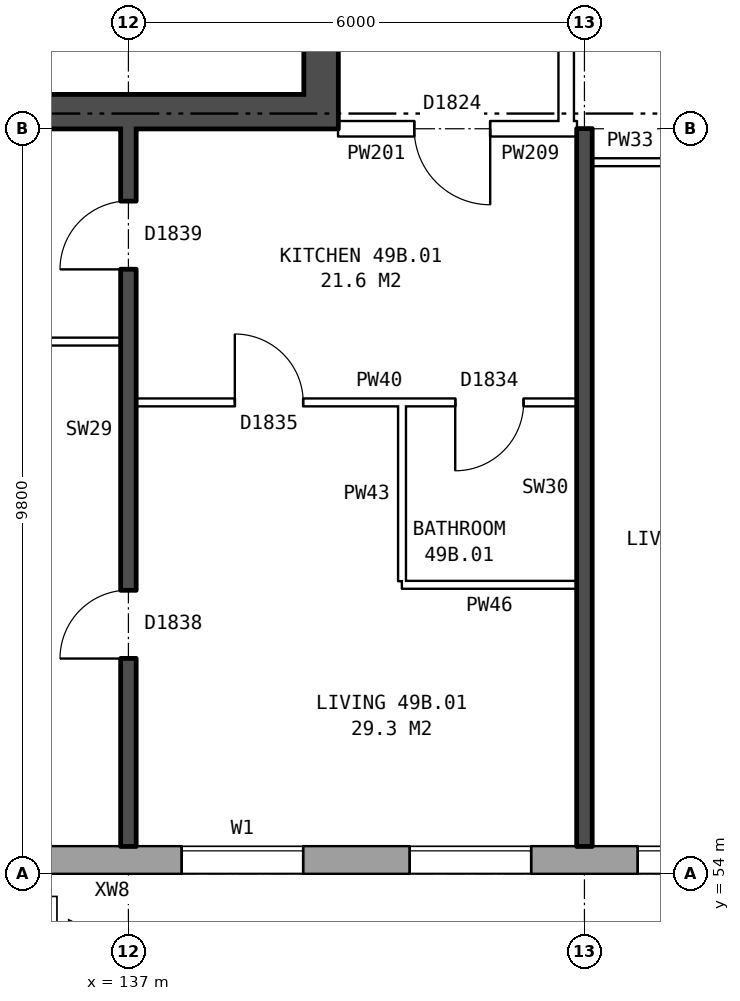
"""IFC4 building model, lengths in metres.
Left out: names, types, materials, properties, quantities, classifications, styles, units other than length and angle.
Written with IfcOpenShell. Run it as: python <this file> out.ifc"""

import sys

from ifc_helpers import new_model, si_unit, direction, frame, frame_2d, origin, place, context, subcontext, project, spatial, rectangle, extrude, element, fill, save


model = new_model("IFC4")
c1 = context("Model", 3, precision=1e-05, world=origin(), true_north=direction((0.0, 1.0)))
c2 = subcontext(c1, "Body", "Model", "MODEL_VIEW")
j1 = project(units=[si_unit("LENGTHUNIT", "METRE"), si_unit("PLANEANGLEUNIT", "RADIAN")], contexts=[c1])
p1 = place(None, origin())
s1 = spatial("IfcSite", under=j1, at=p1, CompositionType="ELEMENT")
p2 = place(p1, origin())
s2 = spatial("IfcBuilding", under=s1, at=p2, CompositionType="ELEMENT")
p3 = place(p2, frame((0.0, 0.0, 175.8)))
s3 = spatial("IfcBuildingStorey", under=s2, at=p3, CompositionType="ELEMENT", Elevation=175.8)
p4 = place(p3, frame((134.075, 54.18, 0.0), z_axis=(0.0, 0.0, 1.0), x_axis=(1.0, 0.0, 0.0)))
e1 = element("IfcWall", 1, at=p4, inside=s3, PredefinedType="STANDARD", context=c2, shape_type="SweptSolid", body=[
    extrude(rectangle(XDim=33.101, YDim=0.36, at=frame_2d((16.55, 0.0))), origin(), (0.0, 0.0, 1.0), 2.85),
])
p5 = place(p4, frame((0.3, 0.0, 0.8)))
e2 = element("IfcOpeningElement", 2, at=p5, cuts=e1, PredefinedType="OPENING", context=c2, shape_type="SweptSolid", body=[
    extrude(rectangle(XDim=0.6, YDim=1.8, at=frame_2d((0.3, 0.9))), frame((0.0, 0.19, 0.0), z_axis=(0.0, -1.0, 0.0), x_axis=(1.0, 0.0, 0.0)), (0.0, 0.0, 1.0), 0.38),
])
p6 = place(p4, frame((3.625, 0.0, 0.8)))
e3 = element("IfcOpeningElement", 3, at=p6, cuts=e1, PredefinedType="OPENING", context=c2, shape_type="SweptSolid", body=[
    extrude(rectangle(XDim=1.6, YDim=1.8, at=frame_2d((0.8, 0.9))), frame((0.0, 0.19, 0.0), z_axis=(0.0, -1.0, 0.0), x_axis=(1.0, 0.0, 0.0)), (0.0, 0.0, 1.0), 0.38),
])
p7 = place(p4, frame((6.625, 0.0, 0.8)))
e4 = element("IfcOpeningElement", 4, at=p7, cuts=e1, PredefinedType="OPENING", context=c2, shape_type="SweptSolid", body=[
    extrude(rectangle(XDim=1.6, YDim=1.8, at=frame_2d((0.8, 0.9))), frame((0.0, 0.19, 0.0), z_axis=(0.0, -1.0, 0.0), x_axis=(1.0, 0.0, 0.0)), (0.0, 0.0, 1.0), 0.38),
])
p8 = place(p4, frame((9.625, 0.0, 0.8)))
e5 = element("IfcOpeningElement", 5, at=p8, cuts=e1, PredefinedType="OPENING", context=c2, shape_type="SweptSolid", body=[
    extrude(rectangle(XDim=1.6, YDim=1.8, at=frame_2d((0.8, 0.9))), frame((0.0, 0.19, 0.0), z_axis=(0.0, -1.0, 0.0), x_axis=(1.0, 0.0, 0.0)), (0.0, 0.0, 1.0), 0.38),
])
p9 = place(p4, frame((12.625, 0.0, 0.8)))
e6 = element("IfcOpeningElement", 6, at=p9, cuts=e1, PredefinedType="OPENING", context=c2, shape_type="SweptSolid", body=[
    extrude(rectangle(XDim=1.6, YDim=1.8, at=frame_2d((0.8, 0.9))), frame((0.0, 0.19, 0.0), z_axis=(0.0, -1.0, 0.0), x_axis=(1.0, 0.0, 0.0)), (0.0, 0.0, 1.0), 0.38),
])
p10 = place(p4, frame((15.625, 0.0, 0.8)))
e7 = element("IfcOpeningElement", 7, at=p10, cuts=e1, PredefinedType="OPENING", context=c2, shape_type="SweptSolid", body=[
    extrude(rectangle(XDim=1.6, YDim=1.8, at=frame_2d((0.8, 0.9))), frame((0.0, 0.19, 0.0), z_axis=(0.0, -1.0, 0.0), x_axis=(1.0, 0.0, 0.0)), (0.0, 0.0, 1.0), 0.38),
])
p11 = place(p4, frame((18.625, 0.0, 0.8)))
e8 = element("IfcOpeningElement", 8, at=p11, cuts=e1, PredefinedType="OPENING", context=c2, shape_type="SweptSolid", body=[
    extrude(rectangle(XDim=1.6, YDim=1.8, at=frame_2d((0.8, 0.9))), frame((0.0, 0.19, 0.0), z_axis=(0.0, -1.0, 0.0), x_axis=(1.0, 0.0, 0.0)), (0.0, 0.0, 1.0), 0.38),
])
p12 = place(p4, frame((21.625, 0.0, 0.8)))
e9 = element("IfcOpeningElement", 9, at=p12, cuts=e1, PredefinedType="OPENING", context=c2, shape_type="SweptSolid", body=[
    extrude(rectangle(XDim=1.6, YDim=1.8, at=frame_2d((0.8, 0.9))), frame((0.0, 0.19, 0.0), z_axis=(0.0, -1.0, 0.0), x_axis=(1.0, 0.0, 0.0)), (0.0, 0.0, 1.0), 0.38),
])
p13 = place(p4, frame((24.625, 0.0, 0.8)))
e10 = element("IfcOpeningElement", 10, at=p13, cuts=e1, PredefinedType="OPENING", context=c2, shape_type="SweptSolid", body=[
    extrude(rectangle(XDim=1.6, YDim=1.8, at=frame_2d((0.8, 0.9))), frame((0.0, 0.19, 0.0), z_axis=(0.0, -1.0, 0.0), x_axis=(1.0, 0.0, 0.0)), (0.0, 0.0, 1.0), 0.38),
])
p14 = place(p4, frame((27.625, 0.0, 0.8)))
e11 = element("IfcOpeningElement", 11, at=p14, cuts=e1, PredefinedType="OPENING", context=c2, shape_type="SweptSolid", body=[
    extrude(rectangle(XDim=1.6, YDim=1.8, at=frame_2d((0.8, 0.9))), frame((0.0, 0.19, 0.0), z_axis=(0.0, -1.0, 0.0), x_axis=(1.0, 0.0, 0.0)), (0.0, 0.0, 1.0), 0.38),
])
p15 = place(p4, frame((29.525, 0.0, 0.8)))
e12 = element("IfcOpeningElement", 12, at=p15, cuts=e1, PredefinedType="OPENING", context=c2, shape_type="SweptSolid", body=[
    extrude(rectangle(XDim=0.6, YDim=0.9, at=frame_2d((0.3, 0.45))), frame((0.0, 0.19, 0.0), z_axis=(0.0, -1.0, 0.0), x_axis=(1.0, 0.0, 0.0)), (0.0, 0.0, 1.0), 0.38),
])
p16 = place(p4, frame((1.2, 0.0, 1.7)))
e13 = element("IfcOpeningElement", 13, at=p16, cuts=e1, PredefinedType="OPENING", context=c2, shape_type="SweptSolid", body=[
    extrude(rectangle(XDim=0.6, YDim=0.9, at=frame_2d((0.3, 0.45))), frame((0.0, 0.19, 0.0), z_axis=(0.0, -1.0, 0.0), x_axis=(1.0, 0.0, 0.0)), (0.0, 0.0, 1.0), 0.38),
])
p17 = place(p4, frame((31.575, 0.0, 1.4)))
e14 = element("IfcOpeningElement", 14, at=p17, cuts=e1, PredefinedType="OPENING", context=c2, shape_type="SweptSolid", body=[
    extrude(rectangle(XDim=1.2, YDim=1.2, at=frame_2d((0.6, 0.6))), frame((0.0, 0.19, 0.0), z_axis=(0.0, -1.0, 0.0), x_axis=(1.0, 0.0, 0.0)), (0.0, 0.0, 1.0), 0.38),
])
p18 = place(p3, frame((139.535, 63.8, 0.0), z_axis=(0.0, 0.0, 1.0), x_axis=(0.0, 1.0, 0.0)))
e15 = element("IfcWall", 15, at=p18, inside=s3, PredefinedType="SHEAR", context=c2, shape_type="SweptSolid", body=[
    extrude(rectangle(XDim=12.4, YDim=0.45, at=frame_2d((6.2, 0.0))), origin(), (0.0, 0.0, 1.0), 2.85),
])
p19 = place(p18, frame((1.325, 0.0, 0.0)))
e16 = element("IfcOpeningElement", 16, at=p19, cuts=e15, PredefinedType="OPENING", context=c2, shape_type="SweptSolid", body=[
    extrude(rectangle(XDim=1.1, YDim=2.1, at=frame_2d((0.55, 1.05))), frame((0.0, 0.235, 0.0), z_axis=(0.0, -1.0, 0.0), x_axis=(1.0, 0.0, 0.0)), (0.0, 0.0, 1.0), 0.47),
])
p20 = place(p18, frame((3.6, 0.0, 0.0)))
e17 = element("IfcOpeningElement", 17, at=p20, cuts=e15, PredefinedType="OPENING", context=c2, shape_type="SweptSolid", body=[
    extrude(rectangle(XDim=1.1, YDim=2.1, at=frame_2d((0.55, 1.05))), frame((0.0, 0.235, 0.0), z_axis=(0.0, -1.0, 0.0), x_axis=(1.0, 0.0, 0.0)), (0.0, 0.0, 1.0), 0.47),
])
p21 = place(p18, frame((5.8, 0.0, 0.0)))
e18 = element("IfcOpeningElement", 18, at=p21, cuts=e15, PredefinedType="OPENING", context=c2, shape_type="SweptSolid", body=[
    extrude(rectangle(XDim=1.1, YDim=2.1, at=frame_2d((0.55, 1.05))), frame((0.0, 0.235, 0.0), z_axis=(0.0, -1.0, 0.0), x_axis=(1.0, 0.0, 0.0)), (0.0, 0.0, 1.0), 0.47),
])
p22 = place(p18, frame((9.9, 0.0, 0.0)))
e19 = element("IfcOpeningElement", 19, at=p22, cuts=e15, PredefinedType="OPENING", context=c2, shape_type="SweptSolid", body=[
    extrude(rectangle(XDim=1.1, YDim=2.1, at=frame_2d((0.55, 1.05))), frame((0.0, 0.235, 0.0), z_axis=(0.0, -1.0, 0.0), x_axis=(1.0, 0.0, 0.0)), (0.0, 0.0, 1.0), 0.47),
])
p23 = place(p18, frame((8.125, 0.0, 0.0)))
e20 = element("IfcOpeningElement", 20, at=p23, cuts=e15, PredefinedType="OPENING", context=c2, shape_type="SweptSolid", body=[
    extrude(rectangle(XDim=0.85, YDim=2.1, at=frame_2d((0.425, 1.05))), frame((0.0, 0.235, 0.0), z_axis=(0.0, -1.0, 0.0), x_axis=(1.0, 0.0, 0.0)), (0.0, 0.0, 1.0), 0.47),
])
p24 = place(p3, frame((139.31, 64.025, 0.0), z_axis=(0.0, 0.0, 1.0), x_axis=(-1.0, 0.0, 0.0)))
e21 = element("IfcWall", 21, at=p24, inside=s3, PredefinedType="SHEAR", context=c2, shape_type="SweptSolid", body=[
    extrude(rectangle(XDim=7.5, YDim=0.45, at=frame_2d((3.75, 0.0))), origin(), (0.0, 0.0, 1.0), 2.85),
])
p25 = place(p3, frame((142.76, 63.9, 0.0), z_axis=(0.0, 0.0, 1.0), x_axis=(0.0, 1.0, 0.0)))
e22 = element("IfcWall", 22, at=p25, inside=s3, PredefinedType="PARTITIONING", context=c2, shape_type="SweptSolid", body=[
    extrude(rectangle(XDim=12.2, YDim=0.2, at=frame_2d((6.1, 0.0))), origin(), (0.0, 0.0, 1.0), 2.85),
])
p26 = place(p25, frame((5.1, 0.0, 0.0)))
e23 = element("IfcOpeningElement", 23, at=p26, cuts=e22, PredefinedType="OPENING", context=c2, shape_type="SweptSolid", body=[
    extrude(rectangle(XDim=2.0, YDim=2.1, at=frame_2d((1.0, 1.05))), frame((0.0, 0.11, 0.0), z_axis=(0.0, -1.0, 0.0), x_axis=(1.0, 0.0, 0.0)), (0.0, 0.0, 1.0), 0.22),
])
p27 = place(p3, frame((140.6, 57.8, 0.0), z_axis=(0.0, 0.0, 1.0), x_axis=(1.0, 0.0, 0.0)))
e24 = element("IfcWall", 24, at=p27, inside=s3, PredefinedType="PARTITIONING", context=c2, shape_type="SweptSolid", body=[
    extrude(rectangle(XDim=2.3, YDim=0.1, at=frame_2d((1.15, 0.0))), origin(), (0.0, 0.0, 1.0), 2.85),
])
p28 = place(p3, frame((137.1, 60.2, 0.0), z_axis=(0.0, 0.0, 1.0), x_axis=(1.0, 0.0, 0.0)))
e25 = element("IfcWall", 25, at=p28, inside=s3, PredefinedType="PARTITIONING", context=c2, shape_type="SweptSolid", body=[
    extrude(rectangle(XDim=5.8, YDim=0.1, at=frame_2d((2.9, 0.0))), origin(), (0.0, 0.0, 1.0), 2.85),
])
p29 = place(p28, frame((1.3, 0.0, 0.0)))
e26 = element("IfcOpeningElement", 26, at=p29, cuts=e25, PredefinedType="OPENING", context=c2, shape_type="SweptSolid", body=[
    extrude(rectangle(XDim=0.9, YDim=2.1, at=frame_2d((0.45, 1.05))), frame((0.0, 0.06, 0.0), z_axis=(0.0, -1.0, 0.0), x_axis=(1.0, 0.0, 0.0)), (0.0, 0.0, 1.0), 0.12),
])
p30 = place(p28, frame((4.2, 0.0, 0.0)))
e27 = element("IfcOpeningElement", 27, at=p30, cuts=e25, PredefinedType="OPENING", context=c2, shape_type="SweptSolid", body=[
    extrude(rectangle(XDim=0.9, YDim=2.1, at=frame_2d((0.45, 1.05))), frame((0.0, 0.06, 0.0), z_axis=(0.0, -1.0, 0.0), x_axis=(1.0, 0.0, 0.0)), (0.0, 0.0, 1.0), 0.12),
])
p31 = place(p3, frame((131.36, 61.0, 0.0), z_axis=(0.0, 0.0, 1.0), x_axis=(1.0, 0.0, 0.0)))
e28 = element("IfcWall", 28, at=p31, inside=s3, PredefinedType="PARTITIONING", context=c2, shape_type="SweptSolid", body=[
    extrude(rectangle(XDim=5.54, YDim=0.1, at=frame_2d((2.77, 0.0))), origin(), (0.0, 0.0, 1.0), 2.85),
])
p32 = place(p3, frame((143.1, 63.36, 0.0), z_axis=(0.0, 0.0, 1.0), x_axis=(1.0, 0.0, 0.0)))
e29 = element("IfcWall", 29, at=p32, inside=s3, PredefinedType="PARTITIONING", context=c2, shape_type="SweptSolid", body=[
    extrude(rectangle(XDim=2.9, YDim=0.1, at=frame_2d((1.45, 0.0))), origin(), (0.0, 0.0, 1.0), 2.85),
])
p33 = place(p32, frame((1.0, 0.0, 0.0)))
e30 = element("IfcOpeningElement", 30, at=p33, cuts=e29, PredefinedType="OPENING", context=c2, shape_type="SweptSolid", body=[
    extrude(rectangle(XDim=0.9, YDim=2.1, at=frame_2d((0.45, 1.05))), frame((0.0, 0.06, 0.0), z_axis=(0.0, -1.0, 0.0), x_axis=(1.0, 0.0, 0.0)), (0.0, 0.0, 1.0), 0.12),
])
p34 = place(p3, frame((139.76, 63.8, 0.0), z_axis=(0.0, 0.0, 1.0), x_axis=(1.0, 0.0, 0.0)))
e31 = element("IfcWall", 31, at=p34, inside=s3, PredefinedType="PARTITIONING", context=c2, shape_type="SweptSolid", body=[
    extrude(rectangle(XDim=3.0, YDim=0.2, at=frame_2d((1.5, 0.0))), origin(), (0.0, 0.0, 1.0), 2.85),
])
p35 = place(p34, frame((1.0, 0.0, 0.0)))
e32 = element("IfcOpeningElement", 32, at=p35, cuts=e31, PredefinedType="OPENING", context=c2, shape_type="SweptSolid", body=[
    extrude(rectangle(XDim=1.0, YDim=2.1, at=frame_2d((0.5, 1.05))), frame((0.0, 0.11, 0.0), z_axis=(0.0, -1.0, 0.0), x_axis=(1.0, 0.0, 0.0)), (0.0, 0.0, 1.0), 0.22),
])
p36 = place(p3, frame((142.76, 63.8, 0.0), z_axis=(0.0, 0.0, 1.0), x_axis=(1.0, 0.0, 0.0)))
e33 = element("IfcWall", 33, at=p36, inside=s3, PredefinedType="PARTITIONING", context=c2, shape_type="SweptSolid", body=[
    extrude(rectangle(XDim=0.14, YDim=0.2, at=frame_2d((0.07, 0.0))), origin(), (0.0, 0.0, 1.0), 2.85),
])
p37 = place(p3, frame((137.0, 54.36, 0.0), z_axis=(0.0, 0.0, 1.0), x_axis=(0.0, 1.0, 0.0)))
e34 = element("IfcWall", 34, at=p37, inside=s3, PredefinedType="SOLIDWALL", context=c2, shape_type="SweptSolid", body=[
    extrude(rectangle(XDim=9.44, YDim=0.2, at=frame_2d((4.72, 0.0))), origin(), (0.0, 0.0, 1.0), 2.85),
])
p38 = place(p37, frame((2.47, 0.0, 0.0)))
e35 = element("IfcOpeningElement", 35, at=p38, cuts=e34, PredefinedType="OPENING", context=c2, shape_type="SweptSolid", body=[
    extrude(rectangle(XDim=0.9, YDim=2.1, at=frame_2d((0.45, 1.05))), frame((0.0, 0.11, 0.0), z_axis=(0.0, -1.0, 0.0), x_axis=(1.0, 0.0, 0.0)), (0.0, 0.0, 1.0), 0.22),
])
p39 = place(p37, frame((7.59, 0.0, 0.0)))
e36 = element("IfcOpeningElement", 36, at=p39, cuts=e34, PredefinedType="OPENING", context=c2, shape_type="SweptSolid", body=[
    extrude(rectangle(XDim=0.9, YDim=2.1, at=frame_2d((0.45, 1.05))), frame((0.0, 0.11, 0.0), z_axis=(0.0, -1.0, 0.0), x_axis=(1.0, 0.0, 0.0)), (0.0, 0.0, 1.0), 0.22),
])
p40 = place(p3, frame((140.6, 57.85, 0.0), z_axis=(0.0, 0.0, 1.0), x_axis=(0.0, 1.0, 0.0)))
e37 = element("IfcWall", 37, at=p40, inside=s3, PredefinedType="PARTITIONING", context=c2, shape_type="SweptSolid", body=[
    extrude(rectangle(XDim=2.3, YDim=0.1, at=frame_2d((1.15, 0.0))), origin(), (0.0, 0.0, 1.0), 2.85),
])
p41 = place(p3, frame((143.0, 54.36, 0.0), z_axis=(0.0, 0.0, 1.0), x_axis=(0.0, 1.0, 0.0)))
e38 = element("IfcWall", 38, at=p41, inside=s3, PredefinedType="SOLIDWALL", context=c2, shape_type="SweptSolid", body=[
    extrude(rectangle(XDim=9.44, YDim=0.2, at=frame_2d((4.72, 0.0))), origin(), (0.0, 0.0, 1.0), 2.85),
])
p42 = place(p6, origin())
e39 = element("IfcWindow", 39, at=p42, inside=s3, PartitioningType="SINGLE_PANEL", PredefinedType="WINDOW", context=c2, shape_type="SweptSolid", body=[
    extrude(rectangle(XDim=1.6, YDim=1.8, at=frame_2d((0.8, 0.9))), frame((0.0, 0.15, 0.0), z_axis=(0.0, -1.0, 0.0), x_axis=(1.0, 0.0, 0.0)), (0.0, 0.0, 1.0), 0.06),
])
fill(e3, e39)
p43 = place(p7, origin())
e40 = element("IfcWindow", 40, at=p43, inside=s3, PartitioningType="SINGLE_PANEL", PredefinedType="WINDOW", context=c2, shape_type="SweptSolid", body=[
    extrude(rectangle(XDim=1.6, YDim=1.8, at=frame_2d((0.8, 0.9))), frame((0.0, 0.15, 0.0), z_axis=(0.0, -1.0, 0.0), x_axis=(1.0, 0.0, 0.0)), (0.0, 0.0, 1.0), 0.06),
])
fill(e4, e40)
p44 = place(p8, origin())
e41 = element("IfcWindow", 41, at=p44, inside=s3, PartitioningType="SINGLE_PANEL", PredefinedType="WINDOW", context=c2, shape_type="SweptSolid", body=[
    extrude(rectangle(XDim=1.6, YDim=1.8, at=frame_2d((0.8, 0.9))), frame((0.0, 0.15, 0.0), z_axis=(0.0, -1.0, 0.0), x_axis=(1.0, 0.0, 0.0)), (0.0, 0.0, 1.0), 0.06),
])
fill(e5, e41)
p45 = place(p38, origin())
e42 = element("IfcDoor", 42, at=p45, inside=s3, OperationType="SINGLE_SWING_LEFT", PredefinedType="DOOR", context=c2, shape_type="SweptSolid", body=[
    extrude(rectangle(XDim=0.9, YDim=2.1, at=frame_2d((0.45, 1.05))), frame((0.0, 0.025, 0.0), z_axis=(0.0, -1.0, 0.0), x_axis=(1.0, 0.0, 0.0)), (0.0, 0.0, 1.0), 0.05),
])
fill(e35, e42)
p46 = place(p39, origin())
e43 = element("IfcDoor", 43, at=p46, inside=s3, OperationType="SINGLE_SWING_LEFT", PredefinedType="DOOR", context=c2, shape_type="SweptSolid", body=[
    extrude(rectangle(XDim=0.9, YDim=2.1, at=frame_2d((0.45, 1.05))), frame((0.0, 0.025, 0.0), z_axis=(0.0, -1.0, 0.0), x_axis=(1.0, 0.0, 0.0)), (0.0, 0.0, 1.0), 0.05),
])
fill(e36, e43)
p47 = place(p35, frame((1.0, 0.0, 0.0), z_axis=(0.0, 0.0, 1.0), x_axis=(-1.0, 0.0, 0.0)))
e44 = element("IfcDoor", 44, at=p47, inside=s3, OperationType="SINGLE_SWING_LEFT", PredefinedType="DOOR", context=c2, shape_type="SweptSolid", body=[
    extrude(rectangle(XDim=1.0, YDim=2.1, at=frame_2d((0.5, 1.05))), frame((0.0, 0.025, 0.0), z_axis=(0.0, -1.0, 0.0), x_axis=(1.0, 0.0, 0.0)), (0.0, 0.0, 1.0), 0.05),
])
fill(e32, e44)
p48 = place(p29, origin())
e45 = element("IfcDoor", 45, at=p48, inside=s3, OperationType="SINGLE_SWING_LEFT", PredefinedType="DOOR", context=c2, shape_type="SweptSolid", body=[
    extrude(rectangle(XDim=0.9, YDim=2.1, at=frame_2d((0.45, 1.05))), frame((0.0, 0.025, 0.0), z_axis=(0.0, -1.0, 0.0), x_axis=(1.0, 0.0, 0.0)), (0.0, 0.0, 1.0), 0.05),
])
fill(e26, e45)
p49 = place(p30, frame((0.9, 0.0, 0.0), z_axis=(0.0, 0.0, 1.0), x_axis=(-1.0, 0.0, 0.0)))
e46 = element("IfcDoor", 46, at=p49, inside=s3, OperationType="SINGLE_SWING_RIGHT", PredefinedType="DOOR", context=c2, shape_type="SweptSolid", body=[
    extrude(rectangle(XDim=0.9, YDim=2.1, at=frame_2d((0.45, 1.05))), frame((0.0, 0.025, 0.0), z_axis=(0.0, -1.0, 0.0), x_axis=(1.0, 0.0, 0.0)), (0.0, 0.0, 1.0), 0.05),
])
fill(e27, e46)
save(model, sys.argv[1])
